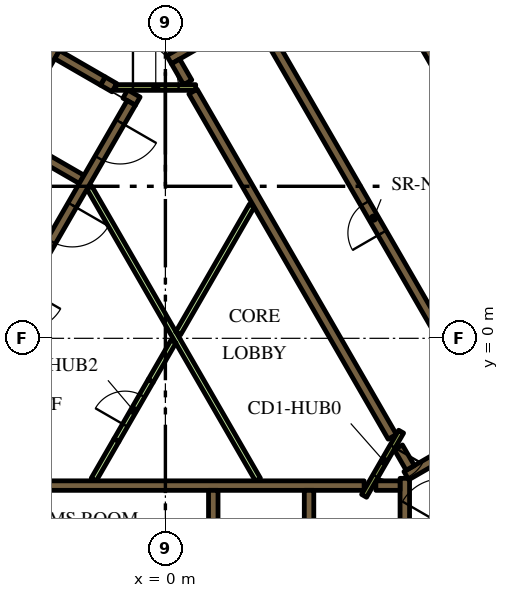
"""IFC4 building model, lengths in metres.
Left out: names, types, materials, properties, quantities, classifications, styles, units other than length and angle.
Written with IfcOpenShell. Run it as: python <this file> out.ifc"""

import sys

from ifc_helpers import new_model, si_unit, direction, frame, frame_2d, origin, place, context, subcontext, project, spatial, polyline, rectangle, outline, extrude, element, fill, save


model = new_model("IFC4")
c1 = context("Model", 3, precision=1e-05, world=origin(), true_north=direction((0.0, 1.0)))
c2 = subcontext(c1, "Body", "Model", "MODEL_VIEW")
j1 = project(units=[si_unit("LENGTHUNIT", "METRE"), si_unit("PLANEANGLEUNIT", "RADIAN")], contexts=[c1])
p1 = place(None, origin())
s1 = spatial("IfcSite", under=j1, at=p1, CompositionType="ELEMENT")
p2 = place(p1, origin())
s2 = spatial("IfcBuilding", under=s1, at=p2, CompositionType="ELEMENT")
p3 = place(p2, frame((0.0, 0.0, 47.1)))
s3 = spatial("IfcBuildingStorey", under=s2, at=p3, CompositionType="ELEMENT", Elevation=47.1)
p4 = place(p3, frame((6.776, 13.364, 0.0), z_axis=(0.0, 0.0, 1.0), x_axis=(0.500004177138, -0.8660229921, 0.0)))
e1 = element("IfcWall", 1, at=p4, inside=s3, PredefinedType="SOLIDWALL", context=c2, shape_type="SweptSolid", body=[
    extrude(rectangle(XDim=20.204, YDim=0.9, at=frame_2d((10.102, 0.0))), origin(), (0.0, 0.0, 1.0), 3.9),
])
p5 = place(p3, frame((-5.259, -3.875, 0.0), z_axis=(0.0, 0.0, 1.0), x_axis=(1.0, 0.0, 0.0)))
e2 = element("IfcWall", 2, at=p5, inside=s3, PredefinedType="SOLIDWALL", context=c2, shape_type="SweptSolid", body=[
    extrude(rectangle(XDim=10.489, YDim=0.25, at=frame_2d((5.244, 0.0))), origin(), (0.0, 0.0, 1.0), 3.9),
])
for number, where, z_axis, x_axis in (
    (3, (3.78, -4.0, 0.0), (0.0, 0.0, 1.0), (0.0, -1.0, 0.0)),
    (4, (1.26, -4.0, 0.0), (0.0, 0.0, 1.0), (0.0, -1.0, 0.0)),
):
    element("IfcWall", number, at=place(p3, frame(where, z_axis=z_axis, x_axis=x_axis)), inside=s3, PredefinedType="SOLIDWALL", context=c2, shape_type="SweptSolid", body=[
        extrude(rectangle(XDim=2.2, YDim=0.25, at=frame_2d((1.1, 0.0))), origin(), (0.0, 0.0, 1.0), 3.9),
    ])
p6 = place(p3, frame((6.3, -7.27, 0.0), z_axis=(0.0, 0.0, 1.0), x_axis=(0.0, 1.0, 0.0)))
e5 = element("IfcWall", 5, at=p6, inside=s3, PredefinedType="SOLIDWALL", context=c2, shape_type="SweptSolid", body=[
    extrude(rectangle(XDim=3.586, YDim=0.25, at=frame_2d((1.793, 0.0))), origin(), (0.0, 0.0, 1.0), 3.9),
])
p7 = place(p3, frame((5.538, -3.875, 0.0), z_axis=(0.0, 0.0, 1.0), x_axis=(1.0, 0.0, 0.0)))
e6 = element("IfcWall", 6, at=p7, inside=s3, PredefinedType="SOLIDWALL", context=c2, shape_type="SweptSolid", body=[
    extrude(rectangle(XDim=0.637, YDim=0.25, at=frame_2d((0.318, 0.0))), origin(), (0.0, 0.0, 1.0), 3.9),
])
p8 = place(p3, frame((9.346, -1.879, 0.0), z_axis=(0.0, 0.0, 1.0), x_axis=(-0.866048528039, -0.499959945477, 0.0)))
e7 = element("IfcWall", 7, at=p8, inside=s3, PredefinedType="SOLIDWALL", context=c2, shape_type="SweptSolid", body=[
    extrude(rectangle(XDim=3.47, YDim=0.25, at=frame_2d((1.735, 0.0))), origin(), (0.0, 0.0, 1.0), 3.9),
])
p9 = place(p3, frame((6.13, -2.867, 0.0), z_axis=(0.0, 0.0, 1.0), x_axis=(0.500160776593, -0.865932559475, 0.0)))
e8 = element("IfcWall", 8, at=p9, inside=s3, PredefinedType="SOLIDWALL", context=c2, shape_type="SweptSolid", body=[
    extrude(rectangle(XDim=0.627, YDim=0.25, at=frame_2d((0.313, 0.0))), origin(), (0.0, 0.0, 1.0), 3.9),
])
p10 = place(p3, origin())
e9 = element("IfcWall", 9, at=p10, inside=s3, PredefinedType="SOLIDWALL", context=c2, shape_type="SweptSolid", body=[
    extrude(outline(polyline([(2.776, 8.733), (2.499, 8.573), (2.498, 8.573), (2.498, 8.573), (2.282, 8.448), (2.282, 8.448), (0.377, 7.348), (0.16, 7.223), (0.035, 7.439), (3.032, 9.169), (3.03, 9.152), (3.03, 9.133), (3.031, 9.113), (3.035, 9.094), (3.04, 9.075), (3.047, 9.057), (3.056, 9.039), (3.119, 8.931), (2.776, 8.733)])), origin(), (0.0, 0.0, 1.0), 3.9),
])
p11 = place(p3, frame((0.268, 7.285, 0.0), z_axis=(0.0, 0.0, 1.0), x_axis=(0.500098681536, -0.865968422476, 0.0)))
e10 = element("IfcWall", 10, at=p11, inside=s3, PredefinedType="SOLIDWALL", context=c2, shape_type="SweptSolid", body=[
    extrude(rectangle(XDim=0.636, YDim=0.25, at=frame_2d((0.318, 0.0))), origin(), (0.0, 0.0, 1.0), 3.9),
])
p12 = place(p3, frame((5.97, -2.591, 0.0), z_axis=(0.0, 0.0, 1.0), x_axis=(-0.499994469932, 0.866028596547, 0.0)))
e11 = element("IfcWall", 11, at=p12, inside=s3, PredefinedType="SOLIDWALL", context=c2, shape_type="SweptSolid", body=[
    extrude(rectangle(XDim=10.488, YDim=0.25, at=frame_2d((5.244, 0.0))), origin(), (0.0, 0.0, 1.0), 3.9),
])
p13 = place(p3, frame((-8.06, -1.311, 0.0), z_axis=(0.0, 0.0, 1.0), x_axis=(0.50000273126, 0.866023826885, 0.0)))
e12 = element("IfcWall", 12, at=p13, inside=s3, PredefinedType="SOLIDWALL", context=c2, shape_type="SweptSolid", body=[
    extrude(rectangle(XDim=10.33, YDim=0.25, at=frame_2d((5.165, 0.0))), origin(), (0.0, 0.0, 1.0), 3.9),
])
p14 = place(p3, frame((-1.342, 6.595, 0.0), z_axis=(0.0, 0.0, 1.0), x_axis=(-0.866046247233, 0.49996389635, 0.0)))
e13 = element("IfcWall", 13, at=p14, inside=s3, PredefinedType="SOLIDWALL", context=c2, shape_type="SweptSolid", body=[
    extrude(rectangle(XDim=0.35, YDim=0.25, at=frame_2d((0.175, 0.0))), origin(), (0.0, 0.0, 1.0), 3.9),
])
p15 = place(p3, frame((-1.647, 6.771, 0.0), z_axis=(0.0, 0.0, 1.0), x_axis=(-0.865971728693, 0.500092956464, 0.0)))
e14 = element("IfcWall", 14, at=p15, inside=s3, PredefinedType="SOLIDWALL", context=c2, shape_type="SweptSolid", body=[
    extrude(rectangle(XDim=1.388, YDim=0.25, at=frame_2d((0.694, 0.0))), origin(), (0.0, 0.0, 1.0), 3.9),
])
p16 = place(p3, frame((-0.728, 6.24, 0.0), z_axis=(0.0, 0.0, 1.0), x_axis=(-0.866088799389, 0.499890179513, 0.0)))
e15 = element("IfcWall", 15, at=p16, inside=s3, PredefinedType="SOLIDWALL", context=c2, shape_type="SweptSolid", body=[
    extrude(rectangle(XDim=0.378, YDim=0.25, at=frame_2d((0.189, 0.0))), origin(), (0.0, 0.0, 1.0), 3.9),
])
p17 = place(p3, frame((-2.204, 4.182, 0.0), z_axis=(0.0, 0.0, 1.0), x_axis=(-0.866008176907, 0.50002983664, 0.0)))
e16 = element("IfcWall", 16, at=p17, inside=s3, PredefinedType="SOLIDWALL", context=c2, shape_type="SweptSolid", body=[
    extrude(rectangle(XDim=2.2, YDim=0.25, at=frame_2d((1.1, 0.0))), origin(), (0.0, 0.0, 1.0), 3.9),
])
p18 = place(p3, frame((-1.887, -3.718, 0.0), z_axis=(0.0, 0.0, 1.0), x_axis=(0.500057179532, 0.865992388649, 0.0)))
e17 = element("IfcWall", 17, at=p18, inside=s3, PredefinedType="PARTITIONING", context=c2, shape_type="SweptSolid", body=[
    extrude(rectangle(XDim=1.199, YDim=0.15, at=frame_2d((0.6, 0.0))), origin(), (0.0, 0.0, 1.0), 2.75),
])
p19 = place(p3, frame((2.435, -3.718, 0.0), z_axis=(0.0, 0.0, 1.0), x_axis=(-0.499985176046, 0.866033962229, 0.0)))
e18 = element("IfcWall", 18, at=p19, inside=s3, PredefinedType="PARTITIONING", context=c2, shape_type="SweptSolid", body=[
    extrude(rectangle(XDim=8.875, YDim=0.15, at=frame_2d((4.438, 0.0))), origin(), (0.0, 0.0, 1.0), 2.75),
])
p20 = place(p3, frame((0.336, 0.132, 0.0), z_axis=(0.0, 0.0, 1.0), x_axis=(0.500001957507, 0.866024273614, 0.0)))
e19 = element("IfcWall", 19, at=p20, inside=s3, PredefinedType="PARTITIONING", context=c2, shape_type="SweptSolid", body=[
    extrude(rectangle(XDim=3.881, YDim=0.15, at=frame_2d((1.941, 0.0))), origin(), (0.0, 0.0, 1.0), 2.75),
])
p21 = place(p3, frame((-0.387, -1.121, 0.0), z_axis=(0.0, 0.0, 1.0), x_axis=(0.500057179532, 0.865992388649, 0.0)))
e20 = element("IfcWall", 20, at=p21, inside=s3, PredefinedType="PARTITIONING", context=c2, shape_type="SweptSolid", body=[
    extrude(rectangle(XDim=1.199, YDim=0.15, at=frame_2d((0.6, 0.0))), origin(), (0.0, 0.0, 1.0), 2.75),
])
p22 = place(p3, frame((11.553, -0.46, 0.0), z_axis=(0.0, 0.0, 1.0), x_axis=(-0.500006514828, 0.866021642414, 0.0)))
e21 = element("IfcWall", 21, at=p22, inside=s3, PredefinedType="SOLIDWALL", context=c2, shape_type="SweptSolid", body=[
    extrude(rectangle(XDim=12.35, YDim=0.25, at=frame_2d((6.175, 0.0))), origin(), (0.0, 0.0, 1.0), 3.9),
])
p23 = place(p22, frame((0.585, 0.0, 0.0)))
e22 = element("IfcOpeningElement", 22, at=p23, cuts=e21, PredefinedType="OPENING", context=c2, shape_type="SweptSolid", body=[
    extrude(rectangle(XDim=1.1, YDim=2.1, at=frame_2d((0.55, 1.05))), frame((0.0, 0.135, 0.0), z_axis=(0.0, -1.0, 0.0), x_axis=(1.0, 0.0, 0.0)), (0.0, 0.0, 1.0), 0.27),
])
p24 = place(p22, frame((3.105, 0.0, 0.0)))
e23 = element("IfcOpeningElement", 23, at=p24, cuts=e21, PredefinedType="OPENING", context=c2, shape_type="SweptSolid", body=[
    extrude(rectangle(XDim=1.1, YDim=2.1, at=frame_2d((0.55, 1.05))), frame((0.0, 0.135, 0.0), z_axis=(0.0, -1.0, 0.0), x_axis=(1.0, 0.0, 0.0)), (0.0, 0.0, 1.0), 0.27),
])
p25 = place(p22, frame((5.625, 0.0, 0.0)))
e24 = element("IfcOpeningElement", 24, at=p25, cuts=e21, PredefinedType="OPENING", context=c2, shape_type="SweptSolid", body=[
    extrude(rectangle(XDim=1.1, YDim=2.1, at=frame_2d((0.55, 1.05))), frame((0.0, 0.135, 0.0), z_axis=(0.0, -1.0, 0.0), x_axis=(1.0, 0.0, 0.0)), (0.0, 0.0, 1.0), 0.27),
])
p26 = place(p3, frame((8.565, -2.185, 0.0), z_axis=(0.0, 0.0, 1.0), x_axis=(-0.499997954832, 0.866026584559, 0.0)))
e25 = element("IfcWall", 25, at=p26, inside=s3, PredefinedType="SOLIDWALL", context=c2, shape_type="SweptSolid", body=[
    extrude(rectangle(XDim=12.35, YDim=0.25, at=frame_2d((6.175, 0.0))), origin(), (0.0, 0.0, 1.0), 3.9),
])
p27 = place(p26, frame((5.725, 0.0, 0.0)))
e26 = element("IfcOpeningElement", 26, at=p27, cuts=e25, PredefinedType="OPENING", context=c2, shape_type="SweptSolid", body=[
    extrude(rectangle(XDim=0.9, YDim=2.1, at=frame_2d((0.45, 1.05))), frame((0.0, 0.135, 0.0), z_axis=(0.0, -1.0, 0.0), x_axis=(1.0, 0.0, 0.0)), (0.0, 0.0, 1.0), 0.27),
])
p28 = place(p3, frame((-0.898, 6.194, 0.0), z_axis=(0.0, 0.0, 1.0), x_axis=(-0.499996202215, -0.866027596426, 0.0)))
e27 = element("IfcWall", 27, at=p28, inside=s3, PredefinedType="SOLIDWALL", context=c2, shape_type="SweptSolid", body=[
    extrude(rectangle(XDim=9.83, YDim=0.25, at=frame_2d((4.915, 0.0))), origin(), (0.0, 0.0, 1.0), 3.9),
])
p29 = place(p28, frame((0.585, 0.0, 0.0)))
e28 = element("IfcOpeningElement", 28, at=p29, cuts=e27, PredefinedType="OPENING", context=c2, shape_type="SweptSolid", body=[
    extrude(rectangle(XDim=1.1, YDim=2.1, at=frame_2d((0.55, 1.05))), frame((0.0, 0.135, 0.0), z_axis=(0.0, -1.0, 0.0), x_axis=(1.0, 0.0, 0.0)), (0.0, 0.0, 1.0), 0.27),
])
p30 = place(p28, frame((3.105, 0.0, 0.0)))
e29 = element("IfcOpeningElement", 29, at=p30, cuts=e27, PredefinedType="OPENING", context=c2, shape_type="SweptSolid", body=[
    extrude(rectangle(XDim=1.1, YDim=2.1, at=frame_2d((0.55, 1.05))), frame((0.0, 0.135, 0.0), z_axis=(0.0, -1.0, 0.0), x_axis=(1.0, 0.0, 0.0)), (0.0, 0.0, 1.0), 0.27),
])
p31 = place(p28, frame((5.625, 0.0, 0.0)))
e30 = element("IfcOpeningElement", 30, at=p31, cuts=e27, PredefinedType="OPENING", context=c2, shape_type="SweptSolid", body=[
    extrude(rectangle(XDim=1.1, YDim=2.1, at=frame_2d((0.55, 1.05))), frame((0.0, 0.135, 0.0), z_axis=(0.0, -1.0, 0.0), x_axis=(1.0, 0.0, 0.0)), (0.0, 0.0, 1.0), 0.27),
])
p32 = place(p28, frame((8.145, 0.0, 0.0)))
e31 = element("IfcOpeningElement", 31, at=p32, cuts=e27, PredefinedType="OPENING", context=c2, shape_type="SweptSolid", body=[
    extrude(rectangle(XDim=1.1, YDim=2.1, at=frame_2d((0.55, 1.05))), frame((0.0, 0.135, 0.0), z_axis=(0.0, -1.0, 0.0), x_axis=(1.0, 0.0, 0.0)), (0.0, 0.0, 1.0), 0.27),
])
p33 = place(p3, frame((7.053, -5.284, 0.0), z_axis=(0.0, 0.0, 1.0), x_axis=(0.500078061341, 0.865980330357, 0.0)))
e32 = element("IfcWall", 32, at=p33, inside=s3, PredefinedType="SOLIDWALL", context=c2, shape_type="SweptSolid", body=[
    extrude(rectangle(XDim=2.1, YDim=0.4, at=frame_2d((1.05, 0.0))), origin(), (0.0, 0.0, 1.0), 3.9),
])
p34 = place(p33, frame((0.45, 0.0, 0.0)))
e33 = element("IfcOpeningElement", 33, at=p34, cuts=e32, PredefinedType="OPENING", context=c2, shape_type="SweptSolid", body=[
    extrude(rectangle(XDim=1.2, YDim=2.1, at=frame_2d((0.6, 1.05))), frame((0.0, 0.21, 0.0), z_axis=(0.0, -1.0, 0.0), x_axis=(1.0, 0.0, 0.0)), (0.0, 0.0, 1.0), 0.42),
])
p35 = place(p3, frame((6.203, -2.456, 0.0), z_axis=(0.0, 0.0, 1.0), x_axis=(-0.500043961785, -0.866000020948, 0.0)))
e34 = element("IfcWall", 34, at=p35, inside=s3, PredefinedType="PARTITIONING", context=c2, shape_type="SweptSolid", body=[
    extrude(rectangle(XDim=1.95, YDim=0.15, at=frame_2d((0.975, 0.0))), origin(), (0.0, 0.0, 1.0), 3.9),
])
p36 = place(p35, frame((0.45, 0.0, 0.0)))
e35 = element("IfcOpeningElement", 35, at=p36, cuts=e34, PredefinedType="OPENING", context=c2, shape_type="SweptSolid", body=[
    extrude(rectangle(XDim=0.9, YDim=2.1, at=frame_2d((0.45, 1.05))), frame((0.0, 0.085, 0.0), z_axis=(0.0, -1.0, 0.0), x_axis=(1.0, 0.0, 0.0)), (0.0, 0.0, 1.0), 0.17),
])
p37 = place(p3, frame((-1.303, 6.6, 0.0), z_axis=(0.0, 0.0, 1.0), x_axis=(1.0, 0.0, 0.0)))
e36 = element("IfcWall", 36, at=p37, inside=s3, PredefinedType="PARTITIONING", context=c2, shape_type="SweptSolid", body=[
    extrude(rectangle(XDim=2.1, YDim=0.15, at=frame_2d((1.05, 0.0))), origin(), (0.0, 0.0, 1.0), 3.9),
])
p38 = place(p37, frame((0.45, 0.0, 0.0)))
e37 = element("IfcOpeningElement", 37, at=p38, cuts=e36, PredefinedType="OPENING", context=c2, shape_type="SweptSolid", body=[
    extrude(rectangle(XDim=1.2, YDim=2.1, at=frame_2d((0.6, 1.05))), frame((0.0, 0.085, 0.0), z_axis=(0.0, -1.0, 0.0), x_axis=(1.0, 0.0, 0.0)), (0.0, 0.0, 1.0), 0.17),
])
p39 = place(p3, frame((-1.287, -2.679, 0.0), z_axis=(0.0, 0.0, 1.0), x_axis=(0.499961193289, 0.866047807691, 0.0)))
e38 = element("IfcWall", 38, at=p39, inside=s3, PredefinedType="PARTITIONING", context=c2, shape_type="SweptSolid", body=[
    extrude(rectangle(XDim=1.8, YDim=0.15, at=frame_2d((0.9, 0.0))), origin(), (0.0, 0.0, 1.0), 2.75),
])
p40 = place(p39, frame((0.45, 0.0, 0.0)))
e39 = element("IfcOpeningElement", 39, at=p40, cuts=e38, PredefinedType="OPENING", context=c2, shape_type="SweptSolid", body=[
    extrude(rectangle(XDim=0.9, YDim=2.1, at=frame_2d((0.45, 1.05))), frame((0.0, 0.085, 0.0), z_axis=(0.0, -1.0, 0.0), x_axis=(1.0, 0.0, 0.0)), (0.0, 0.0, 1.0), 0.17),
])
p41 = place(p3, frame((6.163, 18.475, 0.0), z_axis=(0.0, 0.0, 1.0), x_axis=(0.500001317485, -0.866024643133, 0.0)))
e40 = element("IfcWall", 40, at=p41, inside=s3, PredefinedType="PARTITIONING", context=c2, shape_type="SweptSolid", body=[
    extrude(rectangle(XDim=25.767, YDim=0.15, at=frame_2d((12.883, 0.0))), origin(), (0.0, 0.0, 1.0), 2.75),
])
p42 = place(p41, frame((24.586, 0.0, 0.0)))
e41 = element("IfcOpeningElement", 41, at=p42, cuts=e40, PredefinedType="OPENING", context=c2, shape_type="SweptSolid", body=[
    extrude(rectangle(XDim=1.0, YDim=2.1, at=frame_2d((0.5, 1.05))), frame((0.0, 0.085, 0.0), z_axis=(0.0, -1.0, 0.0), x_axis=(1.0, 0.0, 0.0)), (0.0, 0.0, 1.0), 0.17),
])
p43 = place(p41, frame((16.196, 0.0, 0.0)))
e42 = element("IfcOpeningElement", 42, at=p43, cuts=e40, PredefinedType="OPENING", context=c2, shape_type="SweptSolid", body=[
    extrude(rectangle(XDim=1.0, YDim=2.1, at=frame_2d((0.5, 1.05))), frame((0.0, 0.085, 0.0), z_axis=(0.0, -1.0, 0.0), x_axis=(1.0, 0.0, 0.0)), (0.0, 0.0, 1.0), 0.17),
])
p44 = place(p41, frame((14.789, 0.0, 0.0)))
e43 = element("IfcOpeningElement", 43, at=p44, cuts=e40, PredefinedType="OPENING", context=c2, shape_type="SweptSolid", body=[
    extrude(rectangle(XDim=1.1, YDim=2.1, at=frame_2d((0.55, 1.05))), frame((0.0, 0.085, 0.0), z_axis=(0.0, -1.0, 0.0), x_axis=(1.0, 0.0, 0.0)), (0.0, 0.0, 1.0), 0.17),
])
p45 = place(p41, frame((3.698, 0.0, 0.0)))
e44 = element("IfcOpeningElement", 44, at=p45, cuts=e40, PredefinedType="OPENING", context=c2, shape_type="SweptSolid", body=[
    extrude(rectangle(XDim=1.0, YDim=2.1, at=frame_2d((0.5, 1.05))), frame((0.0, 0.085, 0.0), z_axis=(0.0, -1.0, 0.0), x_axis=(1.0, 0.0, 0.0)), (0.0, 0.0, 1.0), 0.17),
])
p46 = place(p41, frame((2.391, 0.0, 0.0)))
e45 = element("IfcOpeningElement", 45, at=p46, cuts=e40, PredefinedType="OPENING", context=c2, shape_type="SweptSolid", body=[
    extrude(rectangle(XDim=1.0, YDim=2.1, at=frame_2d((0.5, 1.05))), frame((0.0, 0.085, 0.0), z_axis=(0.0, -1.0, 0.0), x_axis=(1.0, 0.0, 0.0)), (0.0, 0.0, 1.0), 0.17),
])
p47 = place(p27, origin())
e46 = element("IfcDoor", 46, at=p47, inside=s3, OperationType="SINGLE_SWING_LEFT", PredefinedType="DOOR", context=c2, shape_type="SweptSolid", body=[
    extrude(rectangle(XDim=0.9, YDim=2.1, at=frame_2d((0.45, 1.05))), frame((0.0, 0.025, 0.0), z_axis=(0.0, -1.0, 0.0), x_axis=(1.0, 0.0, 0.0)), (0.0, 0.0, 1.0), 0.05),
])
fill(e26, e46)
p48 = place(p29, origin())
e47 = element("IfcDoor", 47, at=p48, inside=s3, OperationType="DOUBLE_DOOR_SLIDING", PredefinedType="DOOR", context=c2, shape_type="SweptSolid", body=[
    extrude(rectangle(XDim=1.1, YDim=2.1, at=frame_2d((0.55, 1.05))), frame((0.0, 0.025, 0.0), z_axis=(0.0, -1.0, 0.0), x_axis=(1.0, 0.0, 0.0)), (0.0, 0.0, 1.0), 0.05),
])
fill(e28, e47)
p49 = place(p30, origin())
e48 = element("IfcDoor", 48, at=p49, inside=s3, OperationType="DOUBLE_DOOR_SLIDING", PredefinedType="DOOR", context=c2, shape_type="SweptSolid", body=[
    extrude(rectangle(XDim=1.1, YDim=2.1, at=frame_2d((0.55, 1.05))), frame((0.0, 0.025, 0.0), z_axis=(0.0, -1.0, 0.0), x_axis=(1.0, 0.0, 0.0)), (0.0, 0.0, 1.0), 0.05),
])
fill(e29, e48)
p50 = place(p36, origin())
e49 = element("IfcDoor", 49, at=p50, inside=s3, OperationType="SINGLE_SWING_LEFT", PredefinedType="DOOR", context=c2, shape_type="SweptSolid", body=[
    extrude(rectangle(XDim=0.9, YDim=2.1, at=frame_2d((0.45, 1.05))), frame((0.0, 0.025, 0.0), z_axis=(0.0, -1.0, 0.0), x_axis=(1.0, 0.0, 0.0)), (0.0, 0.0, 1.0), 0.05),
])
fill(e35, e49)
p51 = place(p38, origin())
e50 = element("IfcDoor", 50, at=p51, inside=s3, OperationType="SINGLE_SWING_LEFT", PredefinedType="DOOR", context=c2, shape_type="SweptSolid", body=[
    extrude(rectangle(XDim=1.2, YDim=2.1, at=frame_2d((0.6, 1.05))), frame((0.0, 0.025, 0.0), z_axis=(0.0, -1.0, 0.0), x_axis=(1.0, 0.0, 0.0)), (0.0, 0.0, 1.0), 0.05),
])
fill(e37, e50)
p52 = place(p40, origin())
e51 = element("IfcDoor", 51, at=p52, inside=s3, OperationType="SINGLE_SWING_LEFT", PredefinedType="DOOR", context=c2, shape_type="SweptSolid", body=[
    extrude(rectangle(XDim=0.9, YDim=2.1, at=frame_2d((0.45, 1.05))), frame((0.0, 0.025, 0.0), z_axis=(0.0, -1.0, 0.0), x_axis=(1.0, 0.0, 0.0)), (0.0, 0.0, 1.0), 0.05),
])
fill(e39, e51)
save(model, sys.argv[1])
